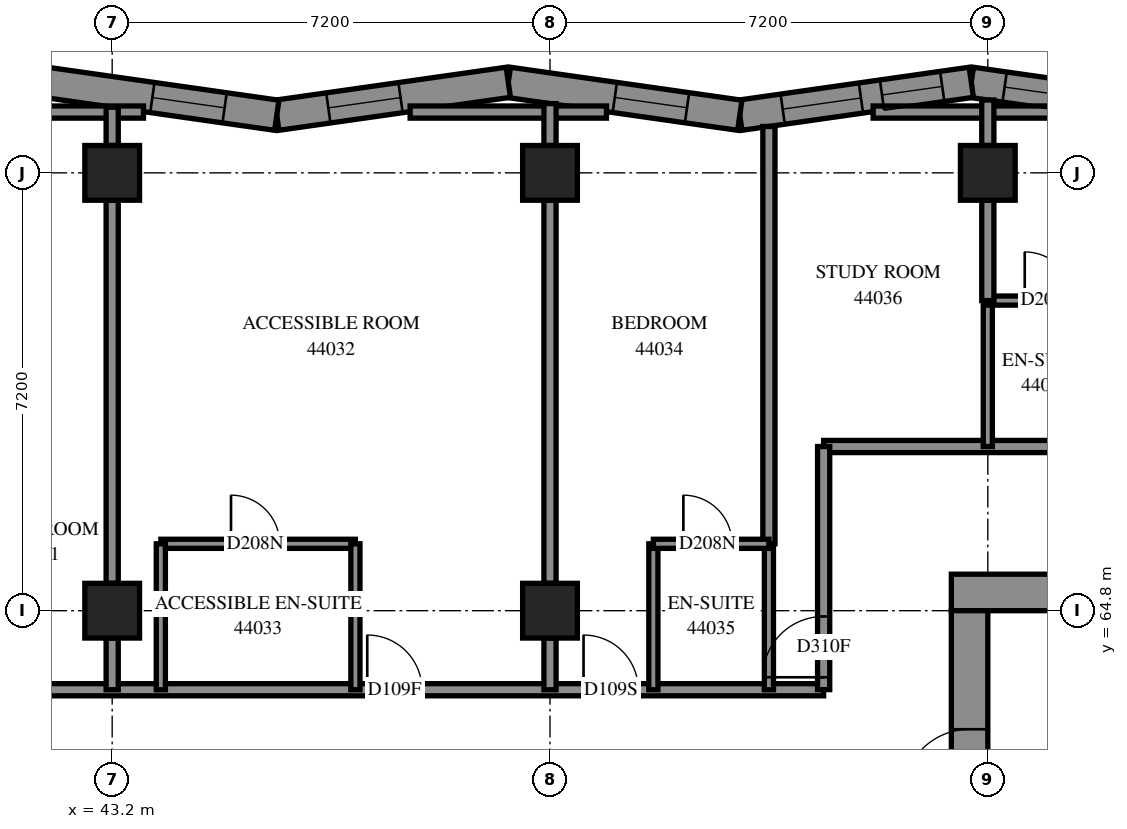
"""IFC4 building model, lengths in metres.
Left out: names, types, materials, properties, quantities, classifications, styles, units other than length and angle.
Written with IfcOpenShell. Run it as: python <this file> out.ifc"""

import sys

from ifc_helpers import new_model, si_unit, direction, frame, frame_2d, origin, origin_2d, place, context, subcontext, project, spatial, polyline, rectangle, outline, extrude, element, fill, save


model = new_model("IFC4")
c1 = context("Model", 3, precision=1e-05, world=origin(), true_north=direction((0.0, 1.0)))
c2 = subcontext(c1, "Body", "Model", "MODEL_VIEW")
j1 = project(units=[si_unit("LENGTHUNIT", "METRE"), si_unit("PLANEANGLEUNIT", "RADIAN")], contexts=[c1])
p1 = place(None, origin())
s1 = spatial("IfcSite", under=j1, at=p1, CompositionType="ELEMENT")
p2 = place(p1, origin())
s2 = spatial("IfcBuilding", under=s1, at=p2, CompositionType="ELEMENT")
p3 = place(p2, frame((0.0, 0.0, 162.6)))
s3 = spatial("IfcBuildingStorey", under=s2, at=p3, CompositionType="ELEMENT", Elevation=162.6)
for number, where, z_axis, x_axis in (
    (1, (43.2, 64.8, 0.0), (0.0, 0.0, 1.0), (1.0, 0.0, 0.0)),
    (2, (43.2, 72.0, 0.0), (0.0, 0.0, 1.0), (1.0, 0.0, 0.0)),
    (3, (50.4, 64.8, 0.0), (0.0, 0.0, 1.0), (1.0, 0.0, 0.0)),
    (4, (50.4, 72.0, 0.0), (0.0, 0.0, 1.0), (1.0, 0.0, 0.0)),
    (5, (57.6, 72.0, 0.0), (0.0, 0.0, 1.0), (1.0, 0.0, 0.0)),
):
    element("IfcColumn", number, at=place(p3, frame(where, z_axis=z_axis, x_axis=x_axis)), inside=s3, PredefinedType="COLUMN", context=c2, shape_type="SweptSolid", body=[
        extrude(rectangle(XDim=0.9, YDim=0.9, at=origin_2d()), origin(), (0.0, 0.0, 1.0), 3.1),
    ])
p4 = place(p3, frame((57.0, 65.1, -0.3), z_axis=(0.0, 0.0, 1.0), x_axis=(1.0, 0.0, 0.0)))
e6 = element("IfcWall", 6, at=p4, inside=s3, PredefinedType="SHEAR", context=c2, shape_type="SweptSolid", body=[
    extrude(rectangle(XDim=15.6, YDim=0.6, at=frame_2d((7.8, 0.0))), origin(), (0.0, 0.0, 1.0), 2.7),
])
p5 = place(p4, frame((10.6, 0.0, 0.3)))
e7 = element("IfcOpeningElement", 7, at=p5, cuts=e6, PredefinedType="OPENING", context=c2, shape_type="SweptSolid", body=[
    extrude(rectangle(XDim=0.8, YDim=2.1, at=frame_2d((0.4, 1.05))), frame((0.0, 0.31, 0.0), z_axis=(0.0, -1.0, 0.0), x_axis=(1.0, 0.0, 0.0)), (0.0, 0.0, 1.0), 0.62),
])
p6 = place(p3, frame((57.3, 50.4, -0.3), z_axis=(0.0, 0.0, 1.0), x_axis=(0.0, 1.0, 0.0)))
e8 = element("IfcWall", 8, at=p6, inside=s3, PredefinedType="SHEAR", context=c2, shape_type="SweptSolid", body=[
    extrude(rectangle(XDim=14.4, YDim=0.6, at=frame_2d((7.2, 0.0))), origin(), (0.0, 0.0, 1.0), 2.7),
])
p7 = place(p6, frame((4.55, 0.0, 0.3)))
e9 = element("IfcOpeningElement", 9, at=p7, cuts=e8, PredefinedType="OPENING", context=c2, shape_type="SweptSolid", body=[
    extrude(rectangle(XDim=1.1, YDim=2.1, at=frame_2d((0.55, 1.05))), frame((0.0, 0.31, 0.0), z_axis=(0.0, -1.0, 0.0), x_axis=(1.0, 0.0, 0.0)), (0.0, 0.0, 1.0), 0.62),
])
p8 = place(p6, frame((11.35, 0.0, 0.3)))
e10 = element("IfcOpeningElement", 10, at=p8, cuts=e8, PredefinedType="OPENING", context=c2, shape_type="SweptSolid", body=[
    extrude(rectangle(XDim=1.1, YDim=2.1, at=frame_2d((0.55, 1.05))), frame((0.0, 0.31, 0.0), z_axis=(0.0, -1.0, 0.0), x_axis=(1.0, 0.0, 0.0)), (0.0, 0.0, 1.0), 0.62),
])
p9 = place(p3, frame((61.135, 72.948, 0.0), z_axis=(0.0, 0.0, 1.0), x_axis=(-0.990016994, 0.1409480459, 0.0)))
e11 = element("IfcWall", 11, at=p9, inside=s3, PredefinedType="SOLIDWALL", context=c2, shape_type="SweptSolid", body=[
    extrude(outline(polyline([(0.036, -0.25), (3.881, -0.25), (3.81, 0.25), (-0.036, 0.25), (0.036, -0.25)])), origin(), (0.0, 0.0, 1.0), 3.1),
])
p10 = place(p9, frame((0.641, 0.0, 0.45)))
e12 = element("IfcOpeningElement", 12, at=p10, cuts=e11, PredefinedType="OPENING", context=c2, shape_type="SweptSolid", body=[
    extrude(rectangle(XDim=1.3, YDim=2.5, at=frame_2d((0.65, 1.25))), frame((0.0, 0.26, 0.0), z_axis=(0.0, -1.0, 0.0), x_axis=(1.0, 0.0, 0.0)), (0.0, 0.0, 1.0), 0.52),
])
p11 = place(p9, frame((2.292, 0.0, 0.45)))
e13 = element("IfcOpeningElement", 13, at=p11, cuts=e11, PredefinedType="OPENING", context=c2, shape_type="SweptSolid", body=[
    extrude(rectangle(XDim=1.0, YDim=2.5, at=frame_2d((0.5, 1.25))), frame((0.0, 0.26, 0.0), z_axis=(0.0, -1.0, 0.0), x_axis=(1.0, 0.0, 0.0)), (0.0, 0.0, 1.0), 0.52),
])
p12 = place(p3, frame((57.328, 73.49, 0.0), z_axis=(0.0, 0.0, 1.0), x_axis=(-0.990016994, -0.1409480459, 0.0)))
e14 = element("IfcWall", 14, at=p12, inside=s3, PredefinedType="SOLIDWALL", context=c2, shape_type="SweptSolid", body=[
    extrude(outline(polyline([(-0.036, -0.25), (3.81, -0.25), (3.881, 0.25), (0.036, 0.25), (-0.036, -0.25)])), origin(), (0.0, 0.0, 1.0), 3.1),
])
p13 = place(p12, frame((0.483, 0.0, 0.45)))
e15 = element("IfcOpeningElement", 15, at=p13, cuts=e14, PredefinedType="OPENING", context=c2, shape_type="SweptSolid", body=[
    extrude(rectangle(XDim=1.0, YDim=2.5, at=frame_2d((0.5, 1.25))), frame((0.0, 0.26, 0.0), z_axis=(0.0, -1.0, 0.0), x_axis=(1.0, 0.0, 0.0)), (0.0, 0.0, 1.0), 0.52),
])
p14 = place(p12, frame((1.833, 0.0, 0.45)))
e16 = element("IfcOpeningElement", 16, at=p14, cuts=e14, PredefinedType="OPENING", context=c2, shape_type="SweptSolid", body=[
    extrude(rectangle(XDim=1.3, YDim=2.5, at=frame_2d((0.65, 1.25))), frame((0.0, 0.26, 0.0), z_axis=(0.0, -1.0, 0.0), x_axis=(1.0, 0.0, 0.0)), (0.0, 0.0, 1.0), 0.52),
])
p15 = place(p3, frame((53.521, 72.948, 0.0), z_axis=(0.0, 0.0, 1.0), x_axis=(-0.990016994, 0.1409480459, 0.0)))
e17 = element("IfcWall", 17, at=p15, inside=s3, PredefinedType="SOLIDWALL", context=c2, shape_type="SweptSolid", body=[
    extrude(outline(polyline([(0.036, -0.25), (3.881, -0.25), (3.81, 0.25), (-0.036, 0.25), (0.036, -0.25)])), origin(), (0.0, 0.0, 1.0), 3.1),
])
p16 = place(p15, frame((0.876, 0.0, 0.45)))
e18 = element("IfcOpeningElement", 18, at=p16, cuts=e17, PredefinedType="OPENING", context=c2, shape_type="SweptSolid", body=[
    extrude(rectangle(XDim=1.2, YDim=2.5, at=frame_2d((0.6, 1.25))), frame((0.0, 0.26, 0.0), z_axis=(0.0, -1.0, 0.0), x_axis=(1.0, 0.0, 0.0)), (0.0, 0.0, 1.0), 0.52),
])
p17 = place(p3, frame((49.714, 73.49, 0.0), z_axis=(0.0, 0.0, 1.0), x_axis=(-0.990016994, -0.1409480459, 0.0)))
e19 = element("IfcWall", 19, at=p17, inside=s3, PredefinedType="SOLIDWALL", context=c2, shape_type="SweptSolid", body=[
    extrude(outline(polyline([(-0.036, -0.25), (3.81, -0.25), (3.881, 0.25), (0.036, 0.25), (-0.036, -0.25)])), origin(), (0.0, 0.0, 1.0), 3.1),
])
p18 = place(p17, frame((1.79, 0.0, 0.45)))
e20 = element("IfcOpeningElement", 20, at=p18, cuts=e19, PredefinedType="OPENING", context=c2, shape_type="SweptSolid", body=[
    extrude(rectangle(XDim=1.2, YDim=2.5, at=frame_2d((0.6, 1.25))), frame((0.0, 0.26, 0.0), z_axis=(0.0, -1.0, 0.0), x_axis=(1.0, 0.0, 0.0)), (0.0, 0.0, 1.0), 0.52),
])
p19 = place(p3, frame((45.907, 72.948, 0.0), z_axis=(0.0, 0.0, 1.0), x_axis=(-0.9900175106, 0.1409444172, 0.0)))
e21 = element("IfcWall", 21, at=p19, inside=s3, PredefinedType="SOLIDWALL", context=c2, shape_type="SweptSolid", body=[
    extrude(outline(polyline([(0.036, -0.25), (3.881, -0.25), (3.81, 0.25), (-0.036, 0.25), (0.036, -0.25)])), origin(), (0.0, 0.0, 1.0), 3.1),
])
p20 = place(p19, frame((0.867, 0.0, 0.45)))
e22 = element("IfcOpeningElement", 22, at=p20, cuts=e21, PredefinedType="OPENING", context=c2, shape_type="SweptSolid", body=[
    extrude(rectangle(XDim=1.2, YDim=2.5, at=frame_2d((0.6, 1.25))), frame((0.0, 0.26, 0.0), z_axis=(0.0, -1.0, 0.0), x_axis=(1.0, 0.0, 0.0)), (0.0, 0.0, 1.0), 0.52),
])
p21 = place(p3, frame((54.9, 67.5, 0.0), z_axis=(0.0, 0.0, 1.0), x_axis=(1.0, 0.0, 0.0)))
e23 = element("IfcWall", 23, at=p21, inside=s3, PredefinedType="PARTITIONING", context=c2, shape_type="SweptSolid", body=[
    extrude(rectangle(XDim=19.8, YDim=0.2, at=frame_2d((9.9, 0.0))), origin(), (0.0, 0.0, 1.0), 3.1),
])
p22 = place(p21, frame((6.599, 0.0, 0.0)))
e24 = element("IfcOpeningElement", 24, at=p22, cuts=e23, PredefinedType="OPENING", context=c2, shape_type="SweptSolid", body=[
    extrude(rectangle(XDim=0.9, YDim=2.1, at=frame_2d((0.45, 1.05))), frame((0.0, 0.11, 0.0), z_axis=(0.0, -1.0, 0.0), x_axis=(1.0, 0.0, 0.0)), (0.0, 0.0, 1.0), 0.22),
])
p23 = place(p21, frame((14.101, 0.0, 0.0)))
e25 = element("IfcOpeningElement", 25, at=p23, cuts=e23, PredefinedType="OPENING", context=c2, shape_type="SweptSolid", body=[
    extrude(rectangle(XDim=0.9, YDim=2.1, at=frame_2d((0.45, 1.05))), frame((0.0, 0.11, 0.0), z_axis=(0.0, -1.0, 0.0), x_axis=(1.0, 0.0, 0.0)), (0.0, 0.0, 1.0), 0.22),
])
p24 = place(p3, frame((40.702, 63.5, 0.0), z_axis=(0.0, 0.0, 1.0), x_axis=(1.0, 0.0, 0.0)))
e26 = element("IfcWall", 26, at=p24, inside=s3, PredefinedType="PARTITIONING", context=c2, shape_type="SweptSolid", body=[
    extrude(rectangle(XDim=14.198, YDim=0.2, at=frame_2d((7.099, 0.0))), origin(), (0.0, 0.0, 1.0), 3.1),
])
p25 = place(p24, frame((6.692, 0.0, 0.0)))
e27 = element("IfcOpeningElement", 27, at=p25, cuts=e26, PredefinedType="OPENING", context=c2, shape_type="SweptSolid", body=[
    extrude(rectangle(XDim=0.9, YDim=2.1, at=frame_2d((0.45, 1.05))), frame((0.0, 0.11, 0.0), z_axis=(0.0, -1.0, 0.0), x_axis=(1.0, 0.0, 0.0)), (0.0, 0.0, 1.0), 0.22),
])
p26 = place(p24, frame((10.25, 0.0, 0.0)))
e28 = element("IfcOpeningElement", 28, at=p26, cuts=e26, PredefinedType="OPENING", context=c2, shape_type="SweptSolid", body=[
    extrude(rectangle(XDim=0.9, YDim=2.1, at=frame_2d((0.45, 1.05))), frame((0.0, 0.11, 0.0), z_axis=(0.0, -1.0, 0.0), x_axis=(1.0, 0.0, 0.0)), (0.0, 0.0, 1.0), 0.22),
])
p27 = place(p3, frame((54.0, 65.9, 0.0), z_axis=(0.0, 0.0, 1.0), x_axis=(0.0, 1.0, 0.0)))
e29 = element("IfcWall", 29, at=p27, inside=s3, PredefinedType="PARTITIONING", context=c2, shape_type="SweptSolid", body=[
    extrude(rectangle(XDim=6.863, YDim=0.2, at=frame_2d((3.432, 0.0))), origin(), (0.0, 0.0, 1.0), 3.1),
])
for number, where, z_axis, x_axis in (
    (30, (43.2, 65.25, 0.0), (0.0, 0.0, 1.0), (0.0, 1.0, 0.0)),
    (31, (50.4, 65.25, 0.0), (0.0, 0.0, 1.0), (0.0, 1.0, 0.0)),
):
    element("IfcWall", number, at=place(p3, frame(where, z_axis=z_axis, x_axis=x_axis)), inside=s3, PredefinedType="PARTITIONING", context=c2, shape_type="SweptSolid", body=[
        extrude(rectangle(XDim=6.3, YDim=0.2, at=frame_2d((3.15, 0.0))), origin(), (0.0, 0.0, 1.0), 3.1),
    ])
p28 = place(p3, frame((54.9, 63.502, 0.0), z_axis=(0.0, 0.0, 1.0), x_axis=(0.0, 1.0, 0.0)))
e32 = element("IfcWall", 32, at=p28, inside=s3, PredefinedType="PARTITIONING", context=c2, shape_type="SweptSolid", body=[
    extrude(rectangle(XDim=3.998, YDim=0.2, at=frame_2d((1.999, 0.0))), origin(), (0.0, 0.0, 1.0), 3.1),
])
p29 = place(p28, frame((0.203, 0.0, 0.0)))
e33 = element("IfcOpeningElement", 33, at=p29, cuts=e32, PredefinedType="OPENING", context=c2, shape_type="SweptSolid", body=[
    extrude(rectangle(XDim=1.0, YDim=2.1, at=frame_2d((0.5, 1.05))), frame((0.0, 0.11, 0.0), z_axis=(0.0, -1.0, 0.0), x_axis=(1.0, 0.0, 0.0)), (0.0, 0.0, 1.0), 0.22),
])
p30 = place(p3, frame((40.486, 73.0, 0.0), z_axis=(0.0, 0.0, 1.0), x_axis=(1.0, 0.0, 0.0)))
e34 = element("IfcWall", 34, at=p30, inside=s3, PredefinedType="PARTITIONING", context=c2, shape_type="SweptSolid", body=[
    extrude(rectangle(XDim=3.229, YDim=0.2, at=frame_2d((1.614, 0.0))), origin(), (0.0, 0.0, 1.0), 3.1),
])
for number, where, z_axis, x_axis in (
    (35, (55.714, 73.0, 0.0), (0.0, 0.0, 1.0), (1.0, 0.0, 0.0)),
    (36, (48.1, 73.0, 0.0), (0.0, 0.0, 1.0), (1.0, 0.0, 0.0)),
):
    element("IfcWall", number, at=place(p3, frame(where, z_axis=z_axis, x_axis=x_axis)), inside=s3, PredefinedType="PARTITIONING", context=c2, shape_type="SweptSolid", body=[
        extrude(rectangle(XDim=3.229, YDim=0.2, at=frame_2d((1.614, 0.0))), origin(), (0.0, 0.0, 1.0), 3.1),
    ])
p31 = place(p3, frame((44.0, 65.9, 0.0), z_axis=(0.0, 0.0, 1.0), x_axis=(1.0, 0.0, 0.0)))
e37 = element("IfcWall", 37, at=p31, inside=s3, PredefinedType="PARTITIONING", context=c2, shape_type="SweptSolid", body=[
    extrude(rectangle(XDim=3.2, YDim=0.15, at=frame_2d((1.6, 0.0))), origin(), (0.0, 0.0, 1.0), 3.1),
])
p32 = place(p31, frame((1.154, 0.0, 0.0)))
e38 = element("IfcOpeningElement", 38, at=p32, cuts=e37, PredefinedType="OPENING", context=c2, shape_type="SweptSolid", body=[
    extrude(rectangle(XDim=0.8, YDim=2.1, at=frame_2d((0.4, 1.05))), frame((0.0, 0.085, 0.0), z_axis=(0.0, -1.0, 0.0), x_axis=(1.0, 0.0, 0.0)), (0.0, 0.0, 1.0), 0.17),
])
for number, where, z_axis, x_axis in (
    (39, (44.0, 63.5, 0.0), (0.0, 0.0, 1.0), (0.0, 1.0, 0.0)),
    (40, (47.2, 63.5, 0.0), (0.0, 0.0, 1.0), (0.0, 1.0, 0.0)),
    (41, (52.1, 63.5, 0.0), (0.0, 0.0, 1.0), (0.0, 1.0, 0.0)),
    (42, (54.0, 63.5, 0.0), (0.0, 0.0, 1.0), (0.0, 1.0, 0.0)),
    (43, (57.6, 67.5, 0.0), (0.0, 0.0, 1.0), (0.0, 1.0, 0.0)),
):
    element("IfcWall", number, at=place(p3, frame(where, z_axis=z_axis, x_axis=x_axis)), inside=s3, PredefinedType="PARTITIONING", context=c2, shape_type="SweptSolid", body=[
        extrude(rectangle(XDim=2.4, YDim=0.15, at=frame_2d((1.2, 0.0))), origin(), (0.0, 0.0, 1.0), 3.1),
    ])
p33 = place(p3, frame((52.1, 65.9, 0.0), z_axis=(0.0, 0.0, 1.0), x_axis=(1.0, 0.0, 0.0)))
e44 = element("IfcWall", 44, at=p33, inside=s3, PredefinedType="PARTITIONING", context=c2, shape_type="SweptSolid", body=[
    extrude(rectangle(XDim=1.9, YDim=0.15, at=frame_2d((0.95, 0.0))), origin(), (0.0, 0.0, 1.0), 3.1),
])
p34 = place(p33, frame((0.493, 0.0, 0.0)))
e45 = element("IfcOpeningElement", 45, at=p34, cuts=e44, PredefinedType="OPENING", context=c2, shape_type="SweptSolid", body=[
    extrude(rectangle(XDim=0.8, YDim=2.1, at=frame_2d((0.4, 1.05))), frame((0.0, 0.085, 0.0), z_axis=(0.0, -1.0, 0.0), x_axis=(1.0, 0.0, 0.0)), (0.0, 0.0, 1.0), 0.17),
])
p35 = place(p3, frame((57.6, 69.9, 0.0), z_axis=(0.0, 0.0, 1.0), x_axis=(1.0, 0.0, 0.0)))
e46 = element("IfcWall", 46, at=p35, inside=s3, PredefinedType="PARTITIONING", context=c2, shape_type="SweptSolid", body=[
    extrude(rectangle(XDim=1.9, YDim=0.15, at=frame_2d((0.95, 0.0))), origin(), (0.0, 0.0, 1.0), 3.1),
])
p36 = place(p35, frame((0.607, 0.0, 0.0)))
e47 = element("IfcOpeningElement", 47, at=p36, cuts=e46, PredefinedType="OPENING", context=c2, shape_type="SweptSolid", body=[
    extrude(rectangle(XDim=0.8, YDim=2.1, at=frame_2d((0.4, 1.05))), frame((0.0, 0.085, 0.0), z_axis=(0.0, -1.0, 0.0), x_axis=(1.0, 0.0, 0.0)), (0.0, 0.0, 1.0), 0.17),
])
p37 = place(p3, frame((57.6, 69.9, 0.0), z_axis=(0.0, 0.0, 1.0), x_axis=(0.0, 1.0, 0.0)))
e48 = element("IfcWall", 48, at=p37, inside=s3, PredefinedType="PARTITIONING", context=c2, shape_type="SweptSolid", body=[
    extrude(rectangle(XDim=1.65, YDim=0.2, at=frame_2d((0.825, 0.0))), origin(), (0.0, 0.0, 1.0), 3.1),
])
for number, where, z_axis, x_axis in (
    (49, (43.2, 63.5, 0.0), (0.0, 0.0, 1.0), (0.0, 1.0, 0.0)),
    (50, (50.4, 63.5, 0.0), (0.0, 0.0, 1.0), (0.0, 1.0, 0.0)),
):
    element("IfcWall", number, at=place(p3, frame(where, z_axis=z_axis, x_axis=x_axis)), inside=s3, PredefinedType="PARTITIONING", context=c2, shape_type="SweptSolid", body=[
        extrude(rectangle(XDim=0.85, YDim=0.2, at=frame_2d((0.425, 0.0))), origin(), (0.0, 0.0, 1.0), 3.1),
    ])
p38 = place(p3, frame((50.4, 72.45, 0.0), z_axis=(0.0, 0.0, 1.0), x_axis=(0.0, 1.0, 0.0)))
e51 = element("IfcWall", 51, at=p38, inside=s3, PredefinedType="PARTITIONING", context=c2, shape_type="SweptSolid", body=[
    extrude(rectangle(XDim=0.689, YDim=0.2, at=frame_2d((0.345, 0.0))), origin(), (0.0, 0.0, 1.0), 3.1),
])
p39 = place(p3, frame((43.2, 72.45, 0.0), z_axis=(0.0, 0.0, 1.0), x_axis=(0.0, 1.0, 0.0)))
e52 = element("IfcWall", 52, at=p39, inside=s3, PredefinedType="PARTITIONING", context=c2, shape_type="SweptSolid", body=[
    extrude(rectangle(XDim=0.63, YDim=0.2, at=frame_2d((0.315, 0.0))), origin(), (0.0, 0.0, 1.0), 3.1),
])
p40 = place(p3, frame((57.6, 72.45, 0.0), z_axis=(0.0, 0.0, 1.0), x_axis=(0.0, 1.0, 0.0)))
e53 = element("IfcWall", 53, at=p40, inside=s3, PredefinedType="PARTITIONING", context=c2, shape_type="SweptSolid", body=[
    extrude(rectangle(XDim=0.748, YDim=0.2, at=frame_2d((0.374, 0.0))), origin(), (0.0, 0.0, 1.0), 3.1),
])
p41 = place(p16, origin())
e54 = element("IfcWindow", 54, at=p41, inside=s3, PartitioningType="SINGLE_PANEL", PredefinedType="WINDOW", context=c2, shape_type="SweptSolid", body=[
    extrude(rectangle(XDim=1.2, YDim=2.5, at=frame_2d((0.6, 1.25))), frame((0.0, 0.18, 0.0), z_axis=(0.0, -1.0, 0.0), x_axis=(1.0, 0.0, 0.0)), (0.0, 0.0, 1.0), 0.06),
])
fill(e18, e54)
p42 = place(p18, origin())
e55 = element("IfcWindow", 55, at=p42, inside=s3, PartitioningType="SINGLE_PANEL", PredefinedType="WINDOW", context=c2, shape_type="SweptSolid", body=[
    extrude(rectangle(XDim=1.2, YDim=2.5, at=frame_2d((0.6, 1.25))), frame((0.0, 0.18, 0.0), z_axis=(0.0, -1.0, 0.0), x_axis=(1.0, 0.0, 0.0)), (0.0, 0.0, 1.0), 0.06),
])
fill(e20, e55)
p43 = place(p20, origin())
e56 = element("IfcWindow", 56, at=p43, inside=s3, PartitioningType="SINGLE_PANEL", PredefinedType="WINDOW", context=c2, shape_type="SweptSolid", body=[
    extrude(rectangle(XDim=1.2, YDim=2.5, at=frame_2d((0.6, 1.25))), frame((0.0, 0.18, 0.0), z_axis=(0.0, -1.0, 0.0), x_axis=(1.0, 0.0, 0.0)), (0.0, 0.0, 1.0), 0.06),
])
fill(e22, e56)
p44 = place(p8, origin())
e57 = element("IfcDoor", 57, at=p44, inside=s3, OperationType="SINGLE_SWING_LEFT", PredefinedType="DOOR", context=c2, shape_type="SweptSolid", body=[
    extrude(rectangle(XDim=1.1, YDim=2.1, at=frame_2d((0.55, 1.05))), frame((0.0, 0.025, 0.0), z_axis=(0.0, -1.0, 0.0), x_axis=(1.0, 0.0, 0.0)), (0.0, 0.0, 1.0), 0.05),
])
fill(e10, e57)
p45 = place(p25, origin())
e58 = element("IfcDoor", 58, at=p45, inside=s3, OperationType="SINGLE_SWING_RIGHT", PredefinedType="DOOR", context=c2, shape_type="SweptSolid", body=[
    extrude(rectangle(XDim=0.9, YDim=2.1, at=frame_2d((0.45, 1.05))), frame((0.0, 0.025, 0.0), z_axis=(0.0, -1.0, 0.0), x_axis=(1.0, 0.0, 0.0)), (0.0, 0.0, 1.0), 0.05),
])
fill(e27, e58)
p46 = place(p32, origin())
e59 = element("IfcDoor", 59, at=p46, inside=s3, OperationType="SINGLE_SWING_RIGHT", PredefinedType="DOOR", context=c2, shape_type="SweptSolid", body=[
    extrude(rectangle(XDim=0.8, YDim=2.1, at=frame_2d((0.4, 1.05))), frame((0.0, 0.025, 0.0), z_axis=(0.0, -1.0, 0.0), x_axis=(1.0, 0.0, 0.0)), (0.0, 0.0, 1.0), 0.05),
])
fill(e38, e59)
p47 = place(p26, origin())
e60 = element("IfcDoor", 60, at=p47, inside=s3, OperationType="SINGLE_SWING_RIGHT", PredefinedType="DOOR", context=c2, shape_type="SweptSolid", body=[
    extrude(rectangle(XDim=0.9, YDim=2.1, at=frame_2d((0.45, 1.05))), frame((0.0, 0.025, 0.0), z_axis=(0.0, -1.0, 0.0), x_axis=(1.0, 0.0, 0.0)), (0.0, 0.0, 1.0), 0.05),
])
fill(e28, e60)
p48 = place(p34, origin())
e61 = element("IfcDoor", 61, at=p48, inside=s3, OperationType="SINGLE_SWING_RIGHT", PredefinedType="DOOR", context=c2, shape_type="SweptSolid", body=[
    extrude(rectangle(XDim=0.8, YDim=2.1, at=frame_2d((0.4, 1.05))), frame((0.0, 0.025, 0.0), z_axis=(0.0, -1.0, 0.0), x_axis=(1.0, 0.0, 0.0)), (0.0, 0.0, 1.0), 0.05),
])
fill(e45, e61)
p49 = place(p29, origin())
e62 = element("IfcDoor", 62, at=p49, inside=s3, OperationType="SINGLE_SWING_LEFT", PredefinedType="DOOR", context=c2, shape_type="SweptSolid", body=[
    extrude(rectangle(XDim=1.0, YDim=2.1, at=frame_2d((0.5, 1.05))), frame((0.0, 0.025, 0.0), z_axis=(0.0, -1.0, 0.0), x_axis=(1.0, 0.0, 0.0)), (0.0, 0.0, 1.0), 0.05),
])
fill(e33, e62)
p50 = place(p36, origin())
e63 = element("IfcDoor", 63, at=p50, inside=s3, OperationType="SINGLE_SWING_RIGHT", PredefinedType="DOOR", context=c2, shape_type="SweptSolid", body=[
    extrude(rectangle(XDim=0.8, YDim=2.1, at=frame_2d((0.4, 1.05))), frame((0.0, 0.025, 0.0), z_axis=(0.0, -1.0, 0.0), x_axis=(1.0, 0.0, 0.0)), (0.0, 0.0, 1.0), 0.05),
])
fill(e47, e63)
p51 = place(p11, origin())
e64 = element("IfcWindow", 64, at=p51, inside=s3, PartitioningType="SINGLE_PANEL", PredefinedType="WINDOW", context=c2, shape_type="SweptSolid", body=[
    extrude(rectangle(XDim=1.0, YDim=2.5, at=frame_2d((0.5, 1.25))), frame((0.0, 0.14, 0.0), z_axis=(0.0, -1.0, 0.0), x_axis=(1.0, 0.0, 0.0)), (0.0, 0.0, 1.0), 0.06),
])
fill(e13, e64)
p52 = place(p13, origin())
e65 = element("IfcWindow", 65, at=p52, inside=s3, PartitioningType="SINGLE_PANEL", PredefinedType="WINDOW", context=c2, shape_type="SweptSolid", body=[
    extrude(rectangle(XDim=1.0, YDim=2.5, at=frame_2d((0.5, 1.25))), frame((0.0, 0.15, 0.0), z_axis=(0.0, -1.0, 0.0), x_axis=(1.0, 0.0, 0.0)), (0.0, 0.0, 1.0), 0.06),
])
fill(e15, e65)
p53 = place(p14, origin())
e66 = element("IfcWindow", 66, at=p53, inside=s3, PartitioningType="SINGLE_PANEL", PredefinedType="WINDOW", context=c2, shape_type="SweptSolid", body=[
    extrude(rectangle(XDim=1.3, YDim=2.5, at=frame_2d((0.65, 1.25))), frame((0.0, 0.18, 0.0), z_axis=(0.0, -1.0, 0.0), x_axis=(1.0, 0.0, 0.0)), (0.0, 0.0, 1.0), 0.06),
])
fill(e16, e66)
save(model, sys.argv[1])
